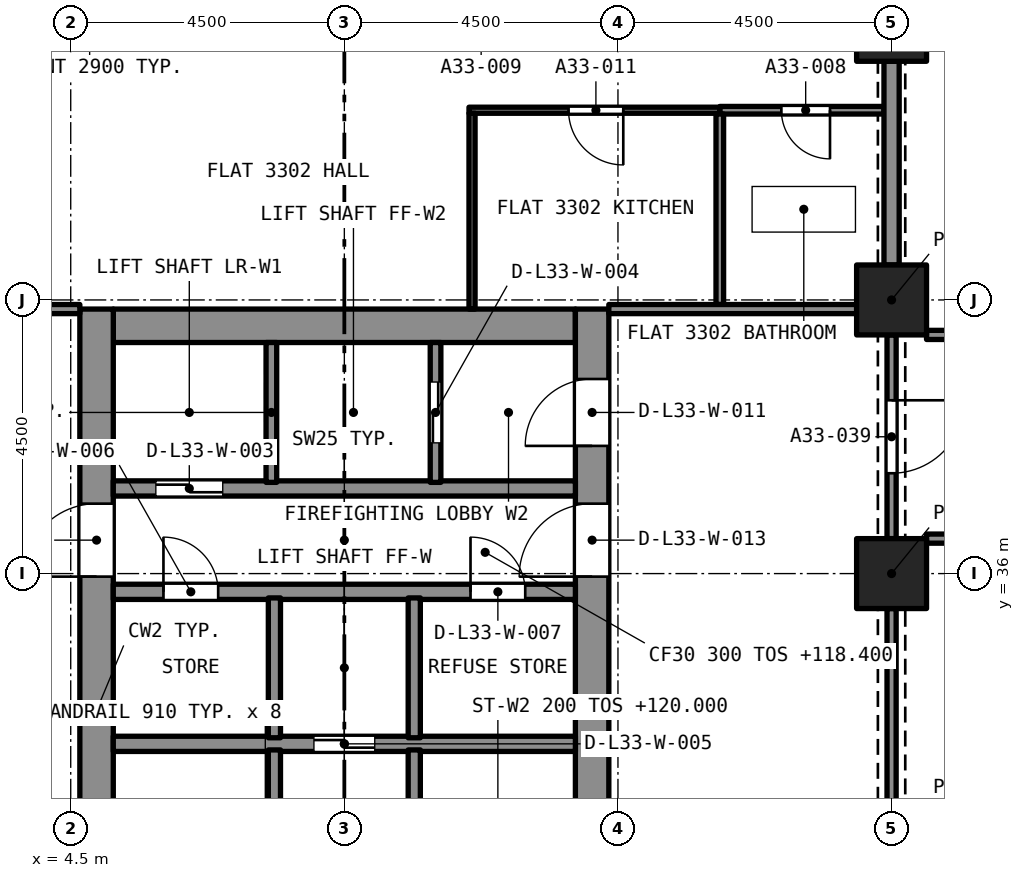
"""IFC4 building model, lengths in metres.
Left out: names, types, materials, properties, quantities, classifications, styles, units other than length and angle.
Written with IfcOpenShell. Run it as: python <this file> out.ifc"""

import sys

from ifc_helpers import new_model, si_unit, direction, frame, frame_2d, origin, origin_2d, place, context, subcontext, project, spatial, rectangle, extrude, element, fill, save


model = new_model("IFC4")
c1 = context("Model", 3, precision=1e-05, world=origin(), true_north=direction((0.0, 1.0)))
c2 = subcontext(c1, "Body", "Model", "MODEL_VIEW")
j1 = project(units=[si_unit("LENGTHUNIT", "METRE"), si_unit("PLANEANGLEUNIT", "RADIAN")], contexts=[c1])
p1 = place(None, origin())
s1 = spatial("IfcSite", under=j1, at=p1, CompositionType="ELEMENT")
p2 = place(p1, origin())
s2 = spatial("IfcBuilding", under=s1, at=p2, CompositionType="ELEMENT")
p3 = place(p2, frame((0.0, 0.0, 118.4)))
s3 = spatial("IfcBuildingStorey", under=s2, at=p3, CompositionType="ELEMENT", Elevation=118.4)
for number, where, z_axis, x_axis in (
    (1, (18.0, 36.0, 0.0), (0.0, 0.0, 1.0), (1.0, 0.0, 0.0)),
    (2, (18.0, 40.5, 0.0), (0.0, 0.0, 1.0), (1.0, 0.0, 0.0)),
    (3, (18.0, 45.0, 0.0), (0.0, 0.0, 1.0), (1.0, 0.0, 0.0)),
):
    element("IfcColumn", number, at=place(p3, frame(where, z_axis=z_axis, x_axis=x_axis)), inside=s3, PredefinedType="COLUMN", context=c2, shape_type="SweptSolid", body=[
        extrude(rectangle(XDim=1.15, YDim=1.15, at=origin_2d()), origin(), (0.0, 0.0, 1.0), 3.2),
    ])
p4 = place(p3, frame((5.2, 40.075, 0.0), z_axis=(0.0, 0.0, 1.0), x_axis=(1.0, 0.0, 0.0)))
e4 = element("IfcWall", 4, at=p4, inside=s3, PredefinedType="SOLIDWALL", context=c2, shape_type="SweptSolid", body=[
    extrude(rectangle(XDim=7.6, YDim=0.55, at=frame_2d((3.8, 0.0))), origin(), (0.0, 0.0, 1.0), 3.2),
])
p5 = place(p3, frame((4.925, 27.15, 0.0), z_axis=(0.0, 0.0, 1.0), x_axis=(0.0, 1.0, 0.0)))
e5 = element("IfcWall", 5, at=p5, inside=s3, PredefinedType="SOLIDWALL", context=c2, shape_type="SweptSolid", body=[
    extrude(rectangle(XDim=13.2, YDim=0.55, at=frame_2d((6.6, 0.0))), origin(), (0.0, 0.0, 1.0), 3.2),
])
p6 = place(p5, frame((8.8, 0.0, 0.0)))
e6 = element("IfcOpeningElement", 6, at=p6, cuts=e5, PredefinedType="OPENING", context=c2, shape_type="SweptSolid", body=[
    extrude(rectangle(XDim=1.2, YDim=2.1, at=frame_2d((0.6, 1.05))), frame((0.0, 0.285, 0.0), z_axis=(0.0, -1.0, 0.0), x_axis=(1.0, 0.0, 0.0)), (0.0, 0.0, 1.0), 0.57),
])
p7 = place(p3, frame((13.075, 27.15, 0.0), z_axis=(0.0, 0.0, 1.0), x_axis=(0.0, 1.0, 0.0)))
e7 = element("IfcWall", 7, at=p7, inside=s3, PredefinedType="SOLIDWALL", context=c2, shape_type="SweptSolid", body=[
    extrude(rectangle(XDim=13.2, YDim=0.55, at=frame_2d((6.6, 0.0))), origin(), (0.0, 0.0, 1.0), 3.2),
])
p8 = place(p7, frame((10.95, 0.0, 0.0)))
e8 = element("IfcOpeningElement", 8, at=p8, cuts=e7, PredefinedType="OPENING", context=c2, shape_type="SweptSolid", body=[
    extrude(rectangle(XDim=1.1, YDim=2.1, at=frame_2d((0.55, 1.05))), frame((0.0, 0.285, 0.0), z_axis=(0.0, -1.0, 0.0), x_axis=(1.0, 0.0, 0.0)), (0.0, 0.0, 1.0), 0.57),
])
p9 = place(p7, frame((8.8, 0.0, 0.0)))
e9 = element("IfcOpeningElement", 9, at=p9, cuts=e7, PredefinedType="OPENING", context=c2, shape_type="SweptSolid", body=[
    extrude(rectangle(XDim=1.2, YDim=2.1, at=frame_2d((0.6, 1.05))), frame((0.0, 0.285, 0.0), z_axis=(0.0, -1.0, 0.0), x_axis=(1.0, 0.0, 0.0)), (0.0, 0.0, 1.0), 0.57),
])
p10 = place(p3, frame((17.875, 43.62, 0.0), z_axis=(0.0, 0.0, 1.0), x_axis=(-1.0, 0.0, 0.0)))
e10 = element("IfcWall", 10, at=p10, inside=s3, PredefinedType="PARTITIONING", context=c2, shape_type="SweptSolid", body=[
    extrude(rectangle(XDim=2.7, YDim=0.125, at=frame_2d((1.35, 0.0))), origin(), (0.0, 0.0, 1.0), 2.9),
])
p11 = place(p10, frame((0.888, 0.0, 0.0)))
e11 = element("IfcOpeningElement", 11, at=p11, cuts=e10, PredefinedType="OPENING", context=c2, shape_type="SweptSolid", body=[
    extrude(rectangle(XDim=0.8, YDim=2.1, at=frame_2d((0.4, 1.05))), frame((0.0, 0.073, 0.0), z_axis=(0.0, -1.0, 0.0), x_axis=(1.0, 0.0, 0.0)), (0.0, 0.0, 1.0), 0.145),
])
p12 = place(p3, frame((15.175, 40.425, 0.0), z_axis=(0.0, 0.0, 1.0), x_axis=(0.0, 1.0, 0.0)))
e12 = element("IfcWall", 12, at=p12, inside=s3, PredefinedType="PARTITIONING", context=c2, shape_type="SweptSolid", body=[
    extrude(rectangle(XDim=3.133, YDim=0.125, at=frame_2d((1.566, 0.0))), origin(), (0.0, 0.0, 1.0), 2.9),
])
p13 = place(p3, frame((18.0, 41.075, 0.0), z_axis=(0.0, 0.0, 1.0), x_axis=(0.0, 1.0, 0.0)))
e13 = element("IfcWall", 13, at=p13, inside=s3, PredefinedType="PARTITIONING", context=c2, shape_type="SweptSolid", body=[
    extrude(rectangle(XDim=3.35, YDim=0.25, at=frame_2d((1.675, 0.0))), origin(), (0.0, 0.0, 1.0), 2.38),
])
p14 = place(p3, frame((15.175, 43.62, 0.0), z_axis=(0.0, 0.0, 1.0), x_axis=(-1.0, 0.0, 0.0)))
e14 = element("IfcWall", 14, at=p14, inside=s3, PredefinedType="PARTITIONING", context=c2, shape_type="SweptSolid", body=[
    extrude(rectangle(XDim=4.125, YDim=0.1, at=frame_2d((2.062, 0.0))), origin(), (0.0, 0.0, 1.0), 2.9),
])
p15 = place(p14, frame((1.587, 0.0, 0.0)))
e15 = element("IfcOpeningElement", 15, at=p15, cuts=e14, PredefinedType="OPENING", context=c2, shape_type="SweptSolid", body=[
    extrude(rectangle(XDim=0.9, YDim=2.1, at=frame_2d((0.45, 1.05))), frame((0.0, 0.06, 0.0), z_axis=(0.0, -1.0, 0.0), x_axis=(1.0, 0.0, 0.0)), (0.0, 0.0, 1.0), 0.12),
])
p16 = place(p3, frame((11.1, 40.35, 0.0), z_axis=(0.0, 0.0, 1.0), x_axis=(0.0, 1.0, 0.0)))
e16 = element("IfcWall", 16, at=p16, inside=s3, PredefinedType="PARTITIONING", context=c2, shape_type="SweptSolid", body=[
    extrude(rectangle(XDim=3.22, YDim=0.1, at=frame_2d((1.61, 0.0))), origin(), (0.0, 0.0, 1.0), 2.9),
])
p17 = place(p3, frame((0.575, 40.35, 0.0), z_axis=(0.0, 0.0, 1.0), x_axis=(1.0, 0.0, 0.0)))
e17 = element("IfcWall", 17, at=p17, inside=s3, PredefinedType="PARTITIONING", context=c2, shape_type="SweptSolid", body=[
    extrude(rectangle(XDim=4.075, YDim=0.15, at=frame_2d((2.038, 0.0))), origin(), (0.0, 0.0, 1.0), 2.9),
])
p18 = place(p17, frame((1.175, 0.0, 0.0)))
e18 = element("IfcOpeningElement", 18, at=p18, cuts=e17, PredefinedType="OPENING", context=c2, shape_type="SweptSolid", body=[
    extrude(rectangle(XDim=1.0, YDim=2.1, at=frame_2d((0.5, 1.05))), frame((0.0, 0.085, 0.0), z_axis=(0.0, -1.0, 0.0), x_axis=(1.0, 0.0, 0.0)), (0.0, 0.0, 1.0), 0.17),
])
p19 = place(p3, frame((13.35, 40.35, 0.0), z_axis=(0.0, 0.0, 1.0), x_axis=(1.0, 0.0, 0.0)))
e19 = element("IfcWall", 19, at=p19, inside=s3, PredefinedType="PARTITIONING", context=c2, shape_type="SweptSolid", body=[
    extrude(rectangle(XDim=4.075, YDim=0.15, at=frame_2d((2.038, 0.0))), origin(), (0.0, 0.0, 1.0), 2.9),
])
p20 = place(p3, frame((18.575, 39.925, 0.0), z_axis=(0.0, 0.0, 1.0), x_axis=(1.0, 0.0, 0.0)))
e20 = element("IfcWall", 20, at=p20, inside=s3, PredefinedType="PARTITIONING", context=c2, shape_type="SweptSolid", body=[
    extrude(rectangle(XDim=8.425, YDim=0.15, at=frame_2d((4.212, 0.0))), origin(), (0.0, 0.0, 1.0), 2.75),
])
p21 = place(p20, frame((3.425, 0.0, 0.0)))
e21 = element("IfcOpeningElement", 21, at=p21, cuts=e20, PredefinedType="OPENING", context=c2, shape_type="SweptSolid", body=[
    extrude(rectangle(XDim=1.0, YDim=2.1, at=frame_2d((0.5, 1.05))), frame((0.0, 0.085, 0.0), z_axis=(0.0, -1.0, 0.0), x_axis=(1.0, 0.0, 0.0)), (0.0, 0.0, 1.0), 0.17),
])
p22 = place(p3, frame((24.75, 36.575, 0.0), z_axis=(0.0, 0.0, 1.0), x_axis=(-1.0, 0.0, 0.0)))
e22 = element("IfcWall", 22, at=p22, inside=s3, PredefinedType="PARTITIONING", context=c2, shape_type="SweptSolid", body=[
    extrude(rectangle(XDim=6.175, YDim=0.15, at=frame_2d((3.087, 0.0))), origin(), (0.0, 0.0, 1.0), 2.75),
])
p23 = place(p22, frame((2.875, 0.0, 0.0)))
e23 = element("IfcOpeningElement", 23, at=p23, cuts=e22, PredefinedType="OPENING", context=c2, shape_type="SweptSolid", body=[
    extrude(rectangle(XDim=1.0, YDim=2.1, at=frame_2d((0.5, 1.05))), frame((0.0, 0.085, 0.0), z_axis=(0.0, -1.0, 0.0), x_axis=(1.0, 0.0, 0.0)), (0.0, 0.0, 1.0), 0.17),
])
p24 = place(p3, frame((18.0, 39.925, 0.0), z_axis=(0.0, 0.0, 1.0), x_axis=(0.0, -1.0, 0.0)))
e24 = element("IfcWall", 24, at=p24, inside=s3, PredefinedType="PARTITIONING", context=c2, shape_type="SweptSolid", body=[
    extrude(rectangle(XDim=3.35, YDim=0.15, at=frame_2d((1.675, 0.0))), origin(), (0.0, 0.0, 1.0), 2.38),
])
p25 = place(p24, frame((1.075, 0.0, 0.0)))
e25 = element("IfcOpeningElement", 25, at=p25, cuts=e24, PredefinedType="OPENING", context=c2, shape_type="SweptSolid", body=[
    extrude(rectangle(XDim=1.2, YDim=2.1, at=frame_2d((0.6, 1.05))), frame((0.0, 0.085, 0.0), z_axis=(0.0, -1.0, 0.0), x_axis=(1.0, 0.0, 0.0)), (0.0, 0.0, 1.0), 0.17),
])
p26 = place(p3, frame((18.0, 32.075, 0.0), z_axis=(0.0, 0.0, 1.0), x_axis=(0.0, 1.0, 0.0)))
e26 = element("IfcWall", 26, at=p26, inside=s3, PredefinedType="PARTITIONING", context=c2, shape_type="SweptSolid", body=[
    extrude(rectangle(XDim=3.35, YDim=0.15, at=frame_2d((1.675, 0.0))), origin(), (0.0, 0.0, 1.0), 2.38),
])
p27 = place(p3, frame((5.2, 33.2, 0.0), z_axis=(0.0, 0.0, 1.0), x_axis=(1.0, 0.0, 0.0)))
e27 = element("IfcWall", 27, at=p27, inside=s3, PredefinedType="SOLIDWALL", context=c2, shape_type="SweptSolid", body=[
    extrude(rectangle(XDim=7.6, YDim=0.25, at=frame_2d((3.8, 0.0))), origin(), (0.0, 0.0, 1.0), 2.9),
])
p28 = place(p27, frame((3.3, 0.0, 0.0)))
e28 = element("IfcOpeningElement", 28, at=p28, cuts=e27, PredefinedType="OPENING", context=c2, shape_type="SweptSolid", body=[
    extrude(rectangle(XDim=1.0, YDim=2.1, at=frame_2d((0.5, 1.05))), frame((0.0, 0.135, 0.0), z_axis=(0.0, -1.0, 0.0), x_axis=(1.0, 0.0, 0.0)), (0.0, 0.0, 1.0), 0.27),
])
p29 = place(p3, frame((5.2, 35.7, 0.0), z_axis=(0.0, 0.0, 1.0), x_axis=(1.0, 0.0, 0.0)))
e29 = element("IfcWall", 29, at=p29, inside=s3, PredefinedType="SOLIDWALL", context=c2, shape_type="SweptSolid", body=[
    extrude(rectangle(XDim=7.6, YDim=0.25, at=frame_2d((3.8, 0.0))), origin(), (0.0, 0.0, 1.0), 2.9),
])
p30 = place(p29, frame((0.825, 0.0, 0.0)))
e30 = element("IfcOpeningElement", 30, at=p30, cuts=e29, PredefinedType="OPENING", context=c2, shape_type="SweptSolid", body=[
    extrude(rectangle(XDim=0.9, YDim=2.1, at=frame_2d((0.45, 1.05))), frame((0.0, 0.135, 0.0), z_axis=(0.0, -1.0, 0.0), x_axis=(1.0, 0.0, 0.0)), (0.0, 0.0, 1.0), 0.27),
])
p31 = place(p29, frame((5.875, 0.0, 0.0)))
e31 = element("IfcOpeningElement", 31, at=p31, cuts=e29, PredefinedType="OPENING", context=c2, shape_type="SweptSolid", body=[
    extrude(rectangle(XDim=0.9, YDim=2.1, at=frame_2d((0.45, 1.05))), frame((0.0, 0.135, 0.0), z_axis=(0.0, -1.0, 0.0), x_axis=(1.0, 0.0, 0.0)), (0.0, 0.0, 1.0), 0.27),
])
p32 = place(p3, frame((5.2, 37.4, 0.0), z_axis=(0.0, 0.0, 1.0), x_axis=(1.0, 0.0, 0.0)))
e32 = element("IfcWall", 32, at=p32, inside=s3, PredefinedType="SOLIDWALL", context=c2, shape_type="SweptSolid", body=[
    extrude(rectangle(XDim=7.6, YDim=0.25, at=frame_2d((3.8, 0.0))), origin(), (0.0, 0.0, 1.0), 2.9),
])
p33 = place(p32, frame((0.7, 0.0, 0.0)))
e33 = element("IfcOpeningElement", 33, at=p33, cuts=e32, PredefinedType="OPENING", context=c2, shape_type="SweptSolid", body=[
    extrude(rectangle(XDim=1.1, YDim=2.4, at=frame_2d((0.55, 1.2))), frame((0.0, 0.135, 0.0), z_axis=(0.0, -1.0, 0.0), x_axis=(1.0, 0.0, 0.0)), (0.0, 0.0, 1.0), 0.27),
])
p34 = place(p3, frame((7.85, 27.7, 0.0), z_axis=(0.0, 0.0, 1.0), x_axis=(0.0, 1.0, 0.0)))
e34 = element("IfcWall", 34, at=p34, inside=s3, PredefinedType="SOLIDWALL", context=c2, shape_type="SweptSolid", body=[
    extrude(rectangle(XDim=5.4, YDim=0.2, at=frame_2d((2.7, 0.0))), origin(), (0.0, 0.0, 1.0), 2.9),
])
p35 = place(p34, frame((0.2, 0.0, 0.0)))
e35 = element("IfcOpeningElement", 35, at=p35, cuts=e34, PredefinedType="OPENING", context=c2, shape_type="SweptSolid", body=[
    extrude(rectangle(XDim=0.9, YDim=2.1, at=frame_2d((0.45, 1.05))), frame((0.0, 0.11, 0.0), z_axis=(0.0, -1.0, 0.0), x_axis=(1.0, 0.0, 0.0)), (0.0, 0.0, 1.0), 0.22),
])
p36 = place(p3, frame((10.15, 27.7, 0.0), z_axis=(0.0, 0.0, 1.0), x_axis=(0.0, 1.0, 0.0)))
e36 = element("IfcWall", 36, at=p36, inside=s3, PredefinedType="SOLIDWALL", context=c2, shape_type="SweptSolid", body=[
    extrude(rectangle(XDim=5.4, YDim=0.2, at=frame_2d((2.7, 0.0))), origin(), (0.0, 0.0, 1.0), 2.9),
])
p37 = place(p36, frame((0.2, 0.0, 0.0)))
e37 = element("IfcOpeningElement", 37, at=p37, cuts=e36, PredefinedType="OPENING", context=c2, shape_type="SweptSolid", body=[
    extrude(rectangle(XDim=0.9, YDim=2.1, at=frame_2d((0.45, 1.05))), frame((0.0, 0.11, 0.0), z_axis=(0.0, -1.0, 0.0), x_axis=(1.0, 0.0, 0.0)), (0.0, 0.0, 1.0), 0.22),
])
for number, where, z_axis, x_axis in (
    (38, (7.85, 33.3, 0.0), (0.0, 0.0, 1.0), (0.0, 1.0, 0.0)),
    (39, (10.15, 33.3, 0.0), (0.0, 0.0, 1.0), (0.0, 1.0, 0.0)),
):
    element("IfcWall", number, at=place(p3, frame(where, z_axis=z_axis, x_axis=x_axis)), inside=s3, PredefinedType="SOLIDWALL", context=c2, shape_type="SweptSolid", body=[
        extrude(rectangle(XDim=2.3, YDim=0.2, at=frame_2d((1.15, 0.0))), origin(), (0.0, 0.0, 1.0), 2.9),
    ])
p38 = place(p3, frame((7.8, 37.5, 0.0), z_axis=(0.0, 0.0, 1.0), x_axis=(0.0, 1.0, 0.0)))
e40 = element("IfcWall", 40, at=p38, inside=s3, PredefinedType="SOLIDWALL", context=c2, shape_type="SweptSolid", body=[
    extrude(rectangle(XDim=2.3, YDim=0.175, at=frame_2d((1.15, 0.0))), origin(), (0.0, 0.0, 1.0), 2.9),
])
p39 = place(p3, frame((10.5, 37.5, 0.0), z_axis=(0.0, 0.0, 1.0), x_axis=(0.0, 1.0, 0.0)))
e41 = element("IfcWall", 41, at=p39, inside=s3, PredefinedType="SOLIDWALL", context=c2, shape_type="SweptSolid", body=[
    extrude(rectangle(XDim=2.3, YDim=0.175, at=frame_2d((1.15, 0.0))), origin(), (0.0, 0.0, 1.0), 2.9),
])
p40 = place(p39, frame((0.65, 0.0, 0.0)))
e42 = element("IfcOpeningElement", 42, at=p40, cuts=e41, PredefinedType="OPENING", context=c2, shape_type="SweptSolid", body=[
    extrude(rectangle(XDim=1.0, YDim=2.1, at=frame_2d((0.5, 1.05))), frame((0.0, 0.097, 0.0), z_axis=(0.0, -1.0, 0.0), x_axis=(1.0, 0.0, 0.0)), (0.0, 0.0, 1.0), 0.195),
])
p41 = place(p11, origin())
e43 = element("IfcDoor", 43, at=p41, inside=s3, OperationType="SINGLE_SWING_LEFT", PredefinedType="DOOR", context=c2, shape_type="SweptSolid", body=[
    extrude(rectangle(XDim=0.8, YDim=2.1, at=frame_2d((0.4, 1.05))), frame((0.0, 0.025, 0.0), z_axis=(0.0, -1.0, 0.0), x_axis=(1.0, 0.0, 0.0)), (0.0, 0.0, 1.0), 0.05),
])
fill(e11, e43)
p42 = place(p15, origin())
e44 = element("IfcDoor", 44, at=p42, inside=s3, OperationType="SINGLE_SWING_LEFT", PredefinedType="DOOR", context=c2, shape_type="SweptSolid", body=[
    extrude(rectangle(XDim=0.9, YDim=2.1, at=frame_2d((0.45, 1.05))), frame((0.0, 0.025, 0.0), z_axis=(0.0, -1.0, 0.0), x_axis=(1.0, 0.0, 0.0)), (0.0, 0.0, 1.0), 0.05),
])
fill(e15, e44)
p43 = place(p25, origin())
e45 = element("IfcDoor", 45, at=p43, inside=s3, OperationType="SINGLE_SWING_LEFT", PredefinedType="DOOR", context=c2, shape_type="SweptSolid", body=[
    extrude(rectangle(XDim=1.2, YDim=2.1, at=frame_2d((0.6, 1.05))), frame((0.0, 0.025, 0.0), z_axis=(0.0, -1.0, 0.0), x_axis=(1.0, 0.0, 0.0)), (0.0, 0.0, 1.0), 0.05),
])
fill(e25, e45)
p44 = place(p33, origin())
e46 = element("IfcDoor", 46, at=p44, inside=s3, OperationType="SLIDING_TO_LEFT", PredefinedType="DOOR", context=c2, shape_type="SweptSolid", body=[
    extrude(rectangle(XDim=1.1, YDim=2.4, at=frame_2d((0.55, 1.2))), frame((0.0, 0.025, 0.0), z_axis=(0.0, -1.0, 0.0), x_axis=(1.0, 0.0, 0.0)), (0.0, 0.0, 1.0), 0.05),
])
fill(e33, e46)
p45 = place(p40, origin())
e47 = element("IfcDoor", 47, at=p45, inside=s3, OperationType="SLIDING_TO_LEFT", PredefinedType="DOOR", context=c2, shape_type="SweptSolid", body=[
    extrude(rectangle(XDim=1.0, YDim=2.1, at=frame_2d((0.5, 1.05))), frame((0.0, 0.025, 0.0), z_axis=(0.0, -1.0, 0.0), x_axis=(1.0, 0.0, 0.0)), (0.0, 0.0, 1.0), 0.05),
])
fill(e42, e47)
p46 = place(p28, origin())
e48 = element("IfcDoor", 48, at=p46, inside=s3, OperationType="SLIDING_TO_LEFT", PredefinedType="DOOR", context=c2, shape_type="SweptSolid", body=[
    extrude(rectangle(XDim=1.0, YDim=2.1, at=frame_2d((0.5, 1.05))), frame((0.0, 0.025, 0.0), z_axis=(0.0, -1.0, 0.0), x_axis=(1.0, 0.0, 0.0)), (0.0, 0.0, 1.0), 0.05),
])
fill(e28, e48)
p47 = place(p30, origin())
e49 = element("IfcDoor", 49, at=p47, inside=s3, OperationType="SINGLE_SWING_LEFT", PredefinedType="DOOR", context=c2, shape_type="SweptSolid", body=[
    extrude(rectangle(XDim=0.9, YDim=2.1, at=frame_2d((0.45, 1.05))), frame((0.0, 0.025, 0.0), z_axis=(0.0, -1.0, 0.0), x_axis=(1.0, 0.0, 0.0)), (0.0, 0.0, 1.0), 0.05),
])
fill(e30, e49)
p48 = place(p31, origin())
e50 = element("IfcDoor", 50, at=p48, inside=s3, OperationType="SINGLE_SWING_LEFT", PredefinedType="DOOR", context=c2, shape_type="SweptSolid", body=[
    extrude(rectangle(XDim=0.9, YDim=2.1, at=frame_2d((0.45, 1.05))), frame((0.0, 0.025, 0.0), z_axis=(0.0, -1.0, 0.0), x_axis=(1.0, 0.0, 0.0)), (0.0, 0.0, 1.0), 0.05),
])
fill(e31, e50)
p49 = place(p8, origin())
e51 = element("IfcDoor", 51, at=p49, inside=s3, OperationType="SINGLE_SWING_LEFT", PredefinedType="DOOR", context=c2, shape_type="SweptSolid", body=[
    extrude(rectangle(XDim=1.1, YDim=2.1, at=frame_2d((0.55, 1.05))), frame((0.0, 0.025, 0.0), z_axis=(0.0, -1.0, 0.0), x_axis=(1.0, 0.0, 0.0)), (0.0, 0.0, 1.0), 0.05),
])
fill(e8, e51)
p50 = place(p6, origin())
e52 = element("IfcDoor", 52, at=p50, inside=s3, OperationType="SINGLE_SWING_LEFT", PredefinedType="DOOR", context=c2, shape_type="SweptSolid", body=[
    extrude(rectangle(XDim=1.2, YDim=2.1, at=frame_2d((0.6, 1.05))), frame((0.0, 0.025, 0.0), z_axis=(0.0, -1.0, 0.0), x_axis=(1.0, 0.0, 0.0)), (0.0, 0.0, 1.0), 0.05),
])
fill(e6, e52)
p51 = place(p9, origin())
e53 = element("IfcDoor", 53, at=p51, inside=s3, OperationType="SINGLE_SWING_LEFT", PredefinedType="DOOR", context=c2, shape_type="SweptSolid", body=[
    extrude(rectangle(XDim=1.2, YDim=2.1, at=frame_2d((0.6, 1.05))), frame((0.0, 0.025, 0.0), z_axis=(0.0, -1.0, 0.0), x_axis=(1.0, 0.0, 0.0)), (0.0, 0.0, 1.0), 0.05),
])
fill(e9, e53)
save(model, sys.argv[1])
